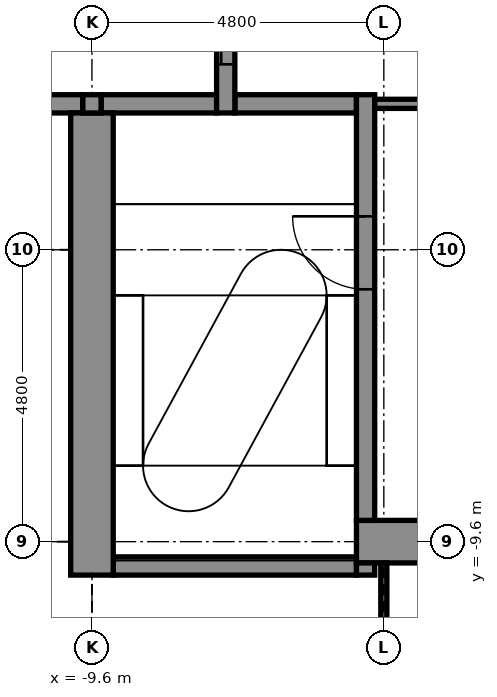
"""IFC4 building model, lengths in metres.
Left out: names, types, materials, properties, quantities, classifications, styles, units other than length and angle.
Written with IfcOpenShell. Run it as: python <this file> out.ifc"""

import sys

from ifc_helpers import new_model, si_unit, direction, frame, frame_2d, origin, place, context, subcontext, project, spatial, rectangle, extrude, element, fill, save


model = new_model("IFC4")
c1 = context("Model", 3, precision=1e-05, world=origin(), true_north=direction((0.0, 1.0)))
c2 = subcontext(c1, "Body", "Model", "MODEL_VIEW")
j1 = project(units=[si_unit("LENGTHUNIT", "METRE"), si_unit("PLANEANGLEUNIT", "RADIAN")], contexts=[c1])
p1 = place(None, origin())
s1 = spatial("IfcSite", under=j1, at=p1, CompositionType="ELEMENT")
p2 = place(p1, origin())
s2 = spatial("IfcBuilding", under=s1, at=p2, CompositionType="ELEMENT")
p3 = place(p2, frame((0.0, 0.0, 150.5)))
s3 = spatial("IfcBuildingStorey", under=s2, at=p3, CompositionType="ELEMENT", Elevation=150.5)
p4 = place(p3, frame((-9.25, -10.0, -0.15), z_axis=(0.0, 0.0, 1.0), x_axis=(1.0, 0.0, 0.0)))
e1 = element("IfcWall", 1, at=p4, inside=s3, PredefinedType="STANDARD", context=c2, shape_type="SweptSolid", body=[
    extrude(rectangle(XDim=4.0, YDim=0.3, at=frame_2d((2.0, 0.0))), origin(), (0.0, 0.0, 1.0), 3.9),
])
p5 = place(p3, frame((-5.25, -9.6, -0.15), z_axis=(0.0, 0.0, 1.0), x_axis=(1.0, 0.0, 0.0)))
e2 = element("IfcWall", 2, at=p5, inside=s3, PredefinedType="SHEAR", context=c2, shape_type="SweptSolid", body=[
    extrude(rectangle(XDim=10.2, YDim=0.7, at=frame_2d((5.1, 0.0))), origin(), (0.0, 0.0, 1.0), 3.9),
])
p6 = place(p5, frame((9.0, 0.0, 0.15)))
e3 = element("IfcOpeningElement", 3, at=p6, cuts=e2, PredefinedType="OPENING", context=c2, shape_type="SweptSolid", body=[
    extrude(rectangle(XDim=0.9, YDim=2.1, at=frame_2d((0.45, 1.05))), frame((0.0, 0.36, 0.0), z_axis=(0.0, -1.0, 0.0), x_axis=(1.0, 0.0, 0.0)), (0.0, 0.0, 1.0), 0.72),
])
p7 = place(p3, frame((-10.85, -2.4, -0.15), z_axis=(0.0, 0.0, 1.0), x_axis=(1.0, 0.0, 0.0)))
e4 = element("IfcWall", 4, at=p7, inside=s3, PredefinedType="STANDARD", context=c2, shape_type="SweptSolid", body=[
    extrude(rectangle(XDim=1.1, YDim=0.3, at=frame_2d((0.55, 0.0))), origin(), (0.0, 0.0, 1.0), 3.9),
])
p8 = place(p3, frame((-9.45, -2.4, -0.15), z_axis=(0.0, 0.0, 1.0), x_axis=(1.0, 0.0, 0.0)))
e5 = element("IfcWall", 5, at=p8, inside=s3, PredefinedType="STANDARD", context=c2, shape_type="SweptSolid", body=[
    extrude(rectangle(XDim=1.9, YDim=0.3, at=frame_2d((0.95, 0.0))), origin(), (0.0, 0.0, 1.0), 3.9),
])
p9 = place(p3, frame((-7.25, -2.4, -0.15), z_axis=(0.0, 0.0, 1.0), x_axis=(1.0, 0.0, 0.0)))
e6 = element("IfcWall", 6, at=p9, inside=s3, PredefinedType="STANDARD", context=c2, shape_type="SweptSolid", body=[
    extrude(rectangle(XDim=2.0, YDim=0.3, at=frame_2d((1.0, 0.0))), origin(), (0.0, 0.0, 1.0), 3.9),
])
p10 = place(p3, frame((-9.6, -10.15, -0.15), z_axis=(0.0, 0.0, 1.0), x_axis=(0.0, 1.0, 0.0)))
e7 = element("IfcWall", 7, at=p10, inside=s3, PredefinedType="SHEAR", context=c2, shape_type="SweptSolid", body=[
    extrude(rectangle(XDim=7.6, YDim=0.7, at=frame_2d((3.8, 0.0))), origin(), (0.0, 0.0, 1.0), 3.9),
])
p11 = place(p3, frame((-9.6, -2.55, -0.15), z_axis=(0.0, 0.0, 1.0), x_axis=(0.0, 1.0, 0.0)))
e8 = element("IfcWall", 8, at=p11, inside=s3, PredefinedType="STANDARD", context=c2, shape_type="SweptSolid", body=[
    extrude(rectangle(XDim=0.3, YDim=0.3, at=frame_2d((0.15, 0.0))), origin(), (0.0, 0.0, 1.0), 3.9),
])
p12 = place(p3, frame((-7.4, -2.55, -0.15), z_axis=(0.0, 0.0, 1.0), x_axis=(0.0, 1.0, 0.0)))
e9 = element("IfcWall", 9, at=p12, inside=s3, PredefinedType="STANDARD", context=c2, shape_type="SweptSolid", body=[
    extrude(rectangle(XDim=5.1, YDim=0.3, at=frame_2d((2.55, 0.0))), origin(), (0.0, 0.0, 1.0), 3.9),
])
p13 = place(p12, frame((0.8, 0.0, 0.15)))
e10 = element("IfcOpeningElement", 10, at=p13, cuts=e9, PredefinedType="OPENING", context=c2, shape_type="SweptSolid", body=[
    extrude(rectangle(XDim=1.1, YDim=2.1, at=frame_2d((0.55, 1.05))), frame((0.0, 0.16, 0.0), z_axis=(0.0, -1.0, 0.0), x_axis=(1.0, 0.0, 0.0)), (0.0, 0.0, 1.0), 0.32),
])
p14 = place(p12, frame((3.2, 0.0, 0.15)))
e11 = element("IfcOpeningElement", 11, at=p14, cuts=e9, PredefinedType="OPENING", context=c2, shape_type="SweptSolid", body=[
    extrude(rectangle(XDim=1.1, YDim=2.1, at=frame_2d((0.55, 1.05))), frame((0.0, 0.16, 0.0), z_axis=(0.0, -1.0, 0.0), x_axis=(1.0, 0.0, 0.0)), (0.0, 0.0, 1.0), 0.32),
])
p15 = place(p3, frame((-5.1, -10.15, -0.15), z_axis=(0.0, 0.0, 1.0), x_axis=(0.0, 1.0, 0.0)))
e12 = element("IfcWall", 12, at=p15, inside=s3, PredefinedType="STANDARD", context=c2, shape_type="SweptSolid", body=[
    extrude(rectangle(XDim=0.2, YDim=0.3, at=frame_2d((0.1, 0.0))), origin(), (0.0, 0.0, 1.0), 3.9),
])
p16 = place(p3, frame((-5.1, -9.25, -0.15), z_axis=(0.0, 0.0, 1.0), x_axis=(0.0, 1.0, 0.0)))
e13 = element("IfcWall", 13, at=p16, inside=s3, PredefinedType="STANDARD", context=c2, shape_type="SweptSolid", body=[
    extrude(rectangle(XDim=7.0, YDim=0.3, at=frame_2d((3.5, 0.0))), origin(), (0.0, 0.0, 1.0), 3.9),
])
p17 = place(p16, frame((3.8, 0.0, 0.15)))
e14 = element("IfcOpeningElement", 14, at=p17, cuts=e13, PredefinedType="OPENING", context=c2, shape_type="SweptSolid", body=[
    extrude(rectangle(XDim=1.2, YDim=2.1, at=frame_2d((0.6, 1.05))), frame((0.0, 0.16, 0.0), z_axis=(0.0, -1.0, 0.0), x_axis=(1.0, 0.0, 0.0)), (0.0, 0.0, 1.0), 0.32),
])
p18 = place(p3, frame((-4.8, -14.8, 0.0), z_axis=(0.0, 0.0, 1.0), x_axis=(0.0, 1.0, 0.0)))
e15 = element("IfcWall", 15, at=p18, inside=s3, PredefinedType="PARTITIONING", context=c2, shape_type="SweptSolid", body=[
    extrude(rectangle(XDim=4.85, YDim=0.1, at=frame_2d((2.425, 0.0))), origin(), (0.0, 0.0, 1.0), 3.066),
])
p19 = place(p3, frame((-4.95, -2.4, 0.0), z_axis=(0.0, 0.0, 1.0), x_axis=(1.0, 0.0, 0.0)))
e16 = element("IfcWall", 16, at=p19, inside=s3, PredefinedType="PARTITIONING", context=c2, shape_type="SweptSolid", body=[
    extrude(rectangle(XDim=1.2, YDim=0.15, at=frame_2d((0.6, 0.0))), origin(), (0.0, 0.0, 1.0), 3.75),
])
p20 = place(p13, origin())
e17 = element("IfcDoor", 17, at=p20, inside=s3, OperationType="DOUBLE_DOOR_SLIDING", PredefinedType="DOOR", context=c2, shape_type="SweptSolid", body=[
    extrude(rectangle(XDim=1.1, YDim=2.1, at=frame_2d((0.55, 1.05))), frame((0.0, 0.025, 0.0), z_axis=(0.0, -1.0, 0.0), x_axis=(1.0, 0.0, 0.0)), (0.0, 0.0, 1.0), 0.05),
])
fill(e10, e17)
p21 = place(p17, origin())
e18 = element("IfcDoor", 18, at=p21, inside=s3, OperationType="SINGLE_SWING_RIGHT", PredefinedType="DOOR", context=c2, shape_type="SweptSolid", body=[
    extrude(rectangle(XDim=1.2, YDim=2.1, at=frame_2d((0.6, 1.05))), frame((0.0, 0.025, 0.0), z_axis=(0.0, -1.0, 0.0), x_axis=(1.0, 0.0, 0.0)), (0.0, 0.0, 1.0), 0.05),
])
fill(e14, e18)
save(model, sys.argv[1])
